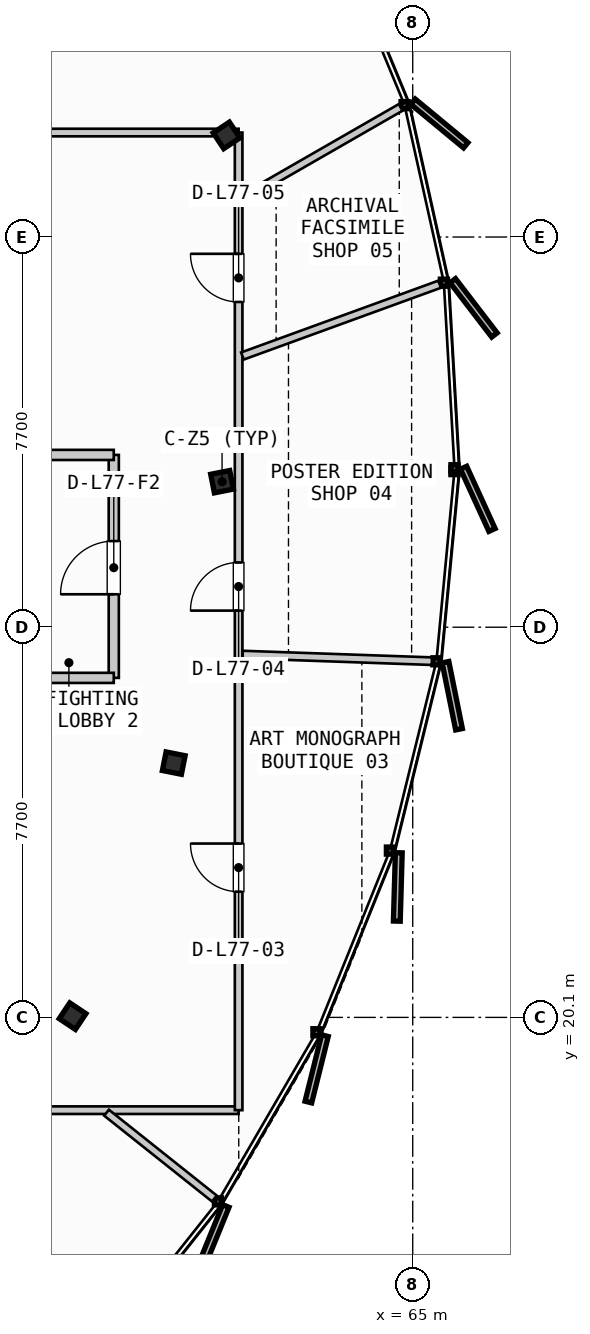
"""IFC4 building model, lengths in metres.
Left out: names, types, materials, properties, quantities, classifications, styles, units other than length and angle.
Written with IfcOpenShell. Run it as: python <this file> out.ifc"""

import sys

from ifc_helpers import new_model, si_unit, direction, frame, frame_2d, origin, origin_2d, place, context, subcontext, project, spatial, rectangle, i_section, extrude, source, transform, mapped, element, fill, save


model = new_model("IFC4")
c1 = context("Model", 3, precision=1e-05, world=origin(), true_north=direction((0.0, 1.0)))
c2 = subcontext(c1, "Body", "Model", "MODEL_VIEW")
j1 = project(units=[si_unit("LENGTHUNIT", "METRE"), si_unit("PLANEANGLEUNIT", "RADIAN")], contexts=[c1])
p1 = place(None, origin())
s1 = spatial("IfcSite", under=j1, at=p1, CompositionType="ELEMENT")
p2 = place(p1, origin())
s2 = spatial("IfcBuilding", under=s1, at=p2, CompositionType="ELEMENT")
p3 = place(p2, frame((0.0, 0.0, 290.5)))
s3 = spatial("IfcBuildingStorey", under=s2, at=p3, CompositionType="ELEMENT", Elevation=290.5)
m1 = source(origin(), c2, "Body", "SweptSolid", [
    extrude(i_section(OverallWidth=0.374, OverallDepth=0.383, WebThickness=0.017, FlangeThickness=0.026, FilletRadius=0.015, at=origin_2d()), origin(), (0.0, 0.0, 1.0), 3.21),
])
for number, where, z_axis, x_axis in (
    (1, (61.237, 30.672, 0.0), (0.0, 0.0, 1.0), (0.981, 0.195, 0.0)),
    (2, (61.326, 37.506, 0.0), (0.0, 0.0, 1.0), (0.831, 0.556, 0.0)),
    (3, (58.287, 20.125, 0.0), (0.0, 0.0, 1.0), (0.831, -0.556, 0.0)),
    (4, (60.284, 25.118, 0.0), (0.0, 0.0, 1.0), (0.981, -0.195, 0.0)),
):
    element("IfcColumn", number, at=place(p3, frame(where, z_axis=z_axis, x_axis=x_axis)), inside=s3, PredefinedType="COLUMN", context=c2, shape_type="MappedRepresentation", body=[
        mapped(m1, transform((0.0, 0.0, 0.0), scale=1.0)),
    ])
p4 = place(p3, frame((59.1, 26.8, 0.0), z_axis=(0.0, 0.0, 1.0), x_axis=(0.0, 1.0, 0.0)))
e5 = element("IfcWall", 5, at=p4, inside=s3, PredefinedType="PARTITIONING", context=c2, shape_type="SweptSolid", body=[
    extrude(rectangle(XDim=4.4, YDim=0.2, at=frame_2d((2.2, 0.0))), origin(), (0.0, 0.0, 1.0), 2.315),
])
p5 = place(p4, frame((1.65, 0.0, 0.0)))
e6 = element("IfcOpeningElement", 6, at=p5, cuts=e5, PredefinedType="OPENING", context=c2, shape_type="SweptSolid", body=[
    extrude(rectangle(XDim=1.05, YDim=2.15, at=frame_2d((0.525, 1.075))), frame((0.0, 0.11, 0.0), z_axis=(0.0, -1.0, 0.0), x_axis=(1.0, 0.0, 0.0)), (0.0, 0.0, 1.0), 0.22),
])
for number, where, z_axis, x_axis in (
    (7, (55.835, 26.8, 0.0), (0.0, 0.0, 1.0), (1.0, 0.0, 0.0)),
    (8, (55.835, 31.2, 0.0), (0.0, 0.0, 1.0), (1.0, 0.0, 0.0)),
):
    element("IfcWall", number, at=place(p3, frame(where, z_axis=z_axis, x_axis=x_axis)), inside=s3, PredefinedType="PARTITIONING", context=c2, shape_type="SweptSolid", body=[
        extrude(rectangle(XDim=3.265, YDim=0.2, at=frame_2d((1.633, 0.0))), origin(), (0.0, 0.0, 1.0), 2.315),
    ])
p6 = place(p3, frame((31.29, 18.269, 0.0), z_axis=(0.0, 0.0, 1.0), x_axis=(1.0, 0.0, 0.0)))
e9 = element("IfcWall", 9, at=p6, inside=s3, PredefinedType="PARTITIONING", context=c2, shape_type="SweptSolid", body=[
    extrude(rectangle(XDim=30.274, YDim=0.15, at=frame_2d((15.137, 0.0))), origin(), (0.0, 0.0, 1.0), 2.315),
])
p7 = place(p6, frame((6.033, 0.0, 0.0)))
e10 = element("IfcOpeningElement", 10, at=p7, cuts=e9, PredefinedType="OPENING", context=c2, shape_type="SweptSolid", body=[
    extrude(rectangle(XDim=0.95, YDim=2.15, at=frame_2d((0.475, 1.075))), frame((0.0, 0.085, 0.0), z_axis=(0.0, -1.0, 0.0), x_axis=(1.0, 0.0, 0.0)), (0.0, 0.0, 1.0), 0.17),
])
p8 = place(p6, frame((19.625, 0.0, 0.0)))
e11 = element("IfcOpeningElement", 11, at=p8, cuts=e9, PredefinedType="OPENING", context=c2, shape_type="SweptSolid", body=[
    extrude(rectangle(XDim=0.95, YDim=2.15, at=frame_2d((0.475, 1.075))), frame((0.0, 0.085, 0.0), z_axis=(0.0, -1.0, 0.0), x_axis=(1.0, 0.0, 0.0)), (0.0, 0.0, 1.0), 0.17),
])
p9 = place(p3, frame((61.564, 18.269, 0.0), z_axis=(0.0, 0.0, 1.0), x_axis=(0.0, 1.0, 0.0)))
e12 = element("IfcWall", 12, at=p9, inside=s3, PredefinedType="PARTITIONING", context=c2, shape_type="SweptSolid", body=[
    extrude(rectangle(XDim=19.293, YDim=0.15, at=frame_2d((9.646, 0.0))), origin(), (0.0, 0.0, 1.0), 2.315),
])
p10 = place(p9, frame((4.312, 0.0, 0.0)))
e13 = element("IfcOpeningElement", 13, at=p10, cuts=e12, PredefinedType="OPENING", context=c2, shape_type="SweptSolid", body=[
    extrude(rectangle(XDim=0.95, YDim=2.15, at=frame_2d((0.475, 1.075))), frame((0.0, 0.085, 0.0), z_axis=(0.0, -1.0, 0.0), x_axis=(1.0, 0.0, 0.0)), (0.0, 0.0, 1.0), 0.17),
])
p11 = place(p9, frame((9.858, 0.0, 0.0)))
e14 = element("IfcOpeningElement", 14, at=p11, cuts=e12, PredefinedType="OPENING", context=c2, shape_type="SweptSolid", body=[
    extrude(rectangle(XDim=0.95, YDim=2.15, at=frame_2d((0.475, 1.075))), frame((0.0, 0.085, 0.0), z_axis=(0.0, -1.0, 0.0), x_axis=(1.0, 0.0, 0.0)), (0.0, 0.0, 1.0), 0.17),
])
p12 = place(p9, frame((15.95, 0.0, 0.0)))
e15 = element("IfcOpeningElement", 15, at=p12, cuts=e12, PredefinedType="OPENING", context=c2, shape_type="SweptSolid", body=[
    extrude(rectangle(XDim=0.95, YDim=2.15, at=frame_2d((0.475, 1.075))), frame((0.0, 0.085, 0.0), z_axis=(0.0, -1.0, 0.0), x_axis=(1.0, 0.0, 0.0)), (0.0, 0.0, 1.0), 0.17),
])
p13 = place(p3, frame((61.564, 37.562, 0.0), z_axis=(0.0, 0.0, 1.0), x_axis=(-1.0, 0.0, 0.0)))
e16 = element("IfcWall", 16, at=p13, inside=s3, PredefinedType="PARTITIONING", context=c2, shape_type="SweptSolid", body=[
    extrude(rectangle(XDim=30.274, YDim=0.15, at=frame_2d((15.137, 0.0))), origin(), (0.0, 0.0, 1.0), 2.315),
])
p14 = place(p13, frame((7.104, 0.0, 0.0)))
e17 = element("IfcOpeningElement", 17, at=p14, cuts=e16, PredefinedType="OPENING", context=c2, shape_type="SweptSolid", body=[
    extrude(rectangle(XDim=0.95, YDim=2.15, at=frame_2d((0.475, 1.075))), frame((0.0, 0.085, 0.0), z_axis=(0.0, -1.0, 0.0), x_axis=(1.0, 0.0, 0.0)), (0.0, 0.0, 1.0), 0.17),
])
p15 = place(p13, frame((20.473, 0.0, 0.0)))
e18 = element("IfcOpeningElement", 18, at=p15, cuts=e16, PredefinedType="OPENING", context=c2, shape_type="SweptSolid", body=[
    extrude(rectangle(XDim=0.95, YDim=2.15, at=frame_2d((0.475, 1.075))), frame((0.0, 0.085, 0.0), z_axis=(0.0, -1.0, 0.0), x_axis=(1.0, 0.0, 0.0)), (0.0, 0.0, 1.0), 0.17),
])
p16 = place(p3, frame((58.958, 18.219, 0.0), z_axis=(0.0, 0.0, 1.0), x_axis=(0.782416187556, -0.622755898767, 0.0)))
e19 = element("IfcWall", 19, at=p16, inside=s3, PredefinedType="PARTITIONING", context=c2, shape_type="SweptSolid", body=[
    extrude(rectangle(XDim=2.72, YDim=0.15, at=frame_2d((1.36, 0.0))), origin(), (0.0, 0.0, 1.0), 2.315),
])
p17 = place(p3, frame((61.644, 27.26, 0.0), z_axis=(0.0, 0.0, 1.0), x_axis=(0.999390846182, -0.034898947938, 0.0)))
e20 = element("IfcWall", 20, at=p17, inside=s3, PredefinedType="PARTITIONING", context=c2, shape_type="SweptSolid", body=[
    extrude(rectangle(XDim=3.736, YDim=0.15, at=frame_2d((1.868, 0.0))), origin(), (0.0, 0.0, 1.0), 2.315),
])
p18 = place(p3, frame((61.639, 33.152, 0.0), z_axis=(0.0, 0.0, 1.0), x_axis=(0.939686662572, 0.342036512939, 0.0)))
e21 = element("IfcWall", 21, at=p18, inside=s3, PredefinedType="PARTITIONING", context=c2, shape_type="SweptSolid", body=[
    extrude(rectangle(XDim=4.141, YDim=0.15, at=frame_2d((2.071, 0.0))), origin(), (0.0, 0.0, 1.0), 2.315),
])
p19 = place(p3, frame((61.633, 36.26, 0.0), z_axis=(0.0, 0.0, 1.0), x_axis=(0.867024695564, 0.498265167639, 0.0)))
e22 = element("IfcWall", 22, at=p19, inside=s3, PredefinedType="PARTITIONING", context=c2, shape_type="SweptSolid", body=[
    extrude(rectangle(XDim=3.608, YDim=0.15, at=frame_2d((1.804, 0.0))), origin(), (0.0, 0.0, 1.0), 2.315),
])
m2 = source(origin(), c2, "Body", "SweptSolid", [
    extrude(rectangle(XDim=1.05, YDim=2.15, at=frame_2d((0.525, 1.075))), frame((0.0, 0.025, 0.0), z_axis=(0.0, -1.0, 0.0), x_axis=(1.0, 0.0, 0.0)), (0.0, 0.0, 1.0), 0.05),
])
p20 = place(p5, origin())
e23 = element("IfcDoor", 23, at=p20, inside=s3, OperationType="SINGLE_SWING_LEFT", PredefinedType="DOOR", context=c2, shape_type="MappedRepresentation", body=[
    mapped(m2, transform((0.0, 0.0, 0.0), scale=1.0)),
])
fill(e6, e23)
m3 = source(origin(), c2, "Body", "SweptSolid", [
    extrude(rectangle(XDim=0.95, YDim=2.15, at=frame_2d((0.475, 1.075))), frame((0.0, 0.025, 0.0), z_axis=(0.0, -1.0, 0.0), x_axis=(1.0, 0.0, 0.0)), (0.0, 0.0, 1.0), 0.05),
])
p21 = place(p10, origin())
e24 = element("IfcDoor", 24, at=p21, inside=s3, OperationType="SINGLE_SWING_RIGHT", PredefinedType="DOOR", context=c2, shape_type="MappedRepresentation", body=[
    mapped(m3, transform((0.0, 0.0, 0.0), scale=1.0)),
])
fill(e13, e24)
p22 = place(p11, origin())
e25 = element("IfcDoor", 25, at=p22, inside=s3, OperationType="SINGLE_SWING_LEFT", PredefinedType="DOOR", context=c2, shape_type="MappedRepresentation", body=[
    mapped(m3, transform((0.0, 0.0, 0.0), scale=1.0)),
])
fill(e14, e25)
p23 = place(p12, origin())
e26 = element("IfcDoor", 26, at=p23, inside=s3, OperationType="SINGLE_SWING_RIGHT", PredefinedType="DOOR", context=c2, shape_type="MappedRepresentation", body=[
    mapped(m3, transform((0.0, 0.0, 0.0), scale=1.0)),
])
fill(e15, e26)
save(model, sys.argv[1])
